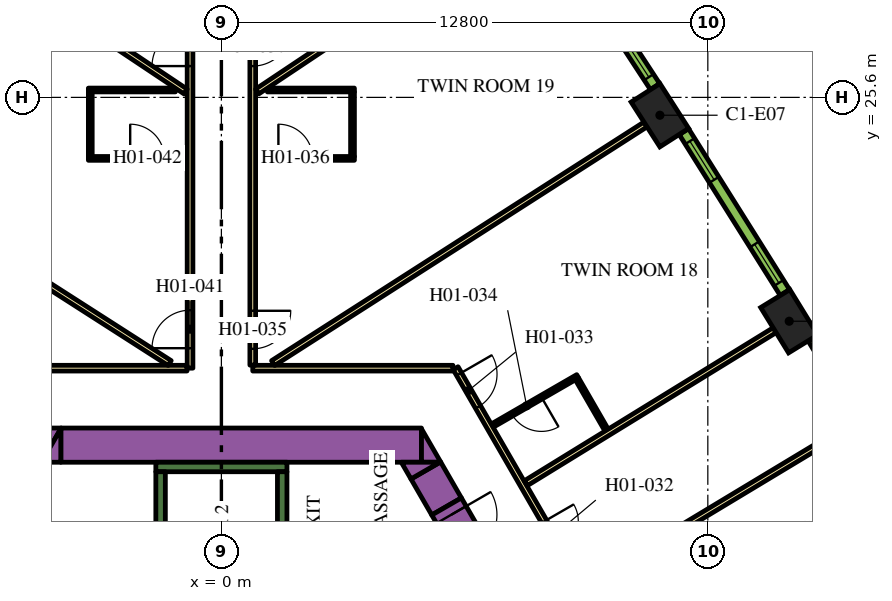
"""IFC4 building model, lengths in metres.
Left out: names, types, materials, properties, quantities, classifications, styles, units other than length and angle.
Written with IfcOpenShell. Run it as: python <this file> out.ifc"""

import sys

from ifc_helpers import new_model, si_unit, direction, frame, frame_2d, origin, origin_2d, place, context, subcontext, project, spatial, polyline, rectangle, outline, extrude, element, fill, save


model = new_model("IFC4")
c1 = context("Model", 3, precision=1e-05, world=origin(), true_north=direction((0.0, 1.0)))
c2 = subcontext(c1, "Body", "Model", "MODEL_VIEW")
j1 = project(units=[si_unit("LENGTHUNIT", "METRE"), si_unit("PLANEANGLEUNIT", "RADIAN")], contexts=[c1])
p1 = place(None, origin())
s1 = spatial("IfcSite", under=j1, at=p1, CompositionType="ELEMENT")
p2 = place(p1, origin())
s2 = spatial("IfcBuilding", under=s1, at=p2, CompositionType="ELEMENT")
p3 = place(p2, frame((0.0, 0.0, 27.6)))
s3 = spatial("IfcBuildingStorey", under=s2, at=p3, CompositionType="ELEMENT", Elevation=27.6)
for number, where, z_axis, x_axis in (
    (1, (14.942, 19.71, 0.0), (0.0, 0.0, 1.0), (-0.524, 0.852, 0.0)),
    (2, (11.539, 25.131, 0.0), (0.0, 0.0, 1.0), (-0.539, 0.842, 0.0)),
):
    element("IfcColumn", number, at=place(p3, frame(where, z_axis=z_axis, x_axis=x_axis)), inside=s3, PredefinedType="COLUMN", context=c2, shape_type="SweptSolid", body=[
        extrude(rectangle(XDim=1.4, YDim=0.9, at=origin_2d()), origin(), (0.0, 0.0, 1.0), 3.9),
    ])
p4 = place(p3, origin())
e3 = element("IfcWall", 3, at=p4, inside=s3, PredefinedType="SOLIDWALL", context=c2, shape_type="SweptSolid", body=[
    extrude(outline(polyline([(-4.215, 16.9), (-4.469, 16.46), (-5.231, 16.9), (-4.215, 16.9)])), origin(), (0.0, 0.0, 1.0), 3.9),
])
p5 = place(p3, frame((-4.224, 16.45, 0.0), z_axis=(0.0, 0.0, 1.0), x_axis=(1.0, 0.0, 0.0)))
e4 = element("IfcWall", 4, at=p5, inside=s3, PredefinedType="SOLIDWALL", context=c2, shape_type="SweptSolid", body=[
    extrude(rectangle(XDim=9.488, YDim=0.9, at=frame_2d((4.744, 0.0))), origin(), (0.0, 0.0, 1.0), 3.9),
])
e5 = element("IfcWall", 5, at=p4, inside=s3, PredefinedType="SOLIDWALL", context=c2, shape_type="SweptSolid", body=[
    extrude(outline(polyline([(5.265, 16.0), (5.265, 16.88), (5.773, 16.0), (5.265, 16.0)])), origin(), (0.0, 0.0, 1.0), 3.9),
])
e6 = element("IfcWall", 6, at=p4, inside=s3, PredefinedType="SOLIDWALL", context=c2, shape_type="SweptSolid", body=[
    extrude(outline(polyline([(-4.734, 16.0), (-4.226, 16.88), (-4.226, 16.0), (-4.734, 16.0)])), origin(), (0.0, 0.0, 1.0), 3.9),
])
p6 = place(p3, frame((5.926, 14.836, 0.0), z_axis=(0.0, 0.0, 1.0), x_axis=(-0.500076735116, 0.865981096212, 0.0)))
e7 = element("IfcWall", 7, at=p6, inside=s3, PredefinedType="SOLIDWALL", context=c2, shape_type="SweptSolid", body=[
    extrude(rectangle(XDim=1.094, YDim=0.9, at=frame_2d((0.547, 0.0))), origin(), (0.0, 0.0, 1.0), 3.9),
])
e8 = element("IfcWall", 8, at=p4, inside=s3, PredefinedType="SOLIDWALL", context=c2, shape_type="SweptSolid", body=[
    extrude(outline(polyline([(4.734, 16.0), (5.75, 16.0), (4.988, 15.56), (4.734, 16.0)])), origin(), (0.0, 0.0, 1.0), 3.9),
])
p7 = place(p3, frame((-1.725, 15.875, 0.0), z_axis=(0.0, 0.0, 1.0), x_axis=(1.0, 0.0, 0.0)))
e9 = element("IfcWall", 9, at=p7, inside=s3, PredefinedType="SOLIDWALL", context=c2, shape_type="SweptSolid", body=[
    extrude(rectangle(XDim=3.45, YDim=0.25, at=frame_2d((1.725, 0.0))), origin(), (0.0, 0.0, 1.0), 3.9),
])
p8 = place(p3, frame((1.6, 8.95, 0.0), z_axis=(0.0, 0.0, 1.0), x_axis=(0.0, 1.0, 0.0)))
e10 = element("IfcWall", 10, at=p8, inside=s3, PredefinedType="SOLIDWALL", context=c2, shape_type="SweptSolid", body=[
    extrude(rectangle(XDim=6.8, YDim=0.25, at=frame_2d((3.4, 0.0))), origin(), (0.0, 0.0, 1.0), 3.9),
])
p9 = place(p3, frame((-1.6, 8.7, 0.0), z_axis=(0.0, 0.0, 1.0), x_axis=(0.0, 1.0, 0.0)))
e11 = element("IfcWall", 11, at=p9, inside=s3, PredefinedType="SOLIDWALL", context=c2, shape_type="SweptSolid", body=[
    extrude(rectangle(XDim=7.05, YDim=0.25, at=frame_2d((3.525, 0.0))), origin(), (0.0, 0.0, 1.0), 3.9),
])
p10 = place(p3, frame((5.926, 14.836, 0.0), z_axis=(0.0, 0.0, 1.0), x_axis=(0.500062241894, -0.865989465428, 0.0)))
e12 = element("IfcWall", 12, at=p10, inside=s3, PredefinedType="SOLIDWALL", context=c2, shape_type="SweptSolid", body=[
    extrude(rectangle(XDim=1.7, YDim=0.9, at=frame_2d((0.85, 0.0))), origin(), (0.0, 0.0, 1.0), 3.9),
])
p11 = place(p10, frame((0.25, 0.0, 0.0)))
e13 = element("IfcOpeningElement", 13, at=p11, cuts=e12, PredefinedType="OPENING", context=c2, shape_type="SweptSolid", body=[
    extrude(rectangle(XDim=1.2, YDim=2.1, at=frame_2d((0.6, 1.05))), frame((0.0, 0.46, 0.0), z_axis=(0.0, -1.0, 0.0), x_axis=(1.0, 0.0, 0.0)), (0.0, 0.0, 1.0), 0.92),
])
p12 = place(p3, frame((6.163, 18.475, 0.0), z_axis=(0.0, 0.0, 1.0), x_axis=(0.500001317485, -0.866024643133, 0.0)))
e14 = element("IfcWall", 14, at=p12, inside=s3, PredefinedType="PARTITIONING", context=c2, shape_type="SweptSolid", body=[
    extrude(rectangle(XDim=25.767, YDim=0.15, at=frame_2d((12.883, 0.0))), origin(), (0.0, 0.0, 1.0), 2.75),
])
p13 = place(p12, frame((24.586, 0.0, 0.0)))
e15 = element("IfcOpeningElement", 15, at=p13, cuts=e14, PredefinedType="OPENING", context=c2, shape_type="SweptSolid", body=[
    extrude(rectangle(XDim=1.0, YDim=2.1, at=frame_2d((0.5, 1.05))), frame((0.0, 0.085, 0.0), z_axis=(0.0, -1.0, 0.0), x_axis=(1.0, 0.0, 0.0)), (0.0, 0.0, 1.0), 0.17),
])
p14 = place(p12, frame((19.319, 0.0, 0.0)))
e16 = element("IfcOpeningElement", 16, at=p14, cuts=e14, PredefinedType="OPENING", context=c2, shape_type="SweptSolid", body=[
    extrude(rectangle(XDim=1.0, YDim=2.1, at=frame_2d((0.5, 1.05))), frame((0.0, 0.085, 0.0), z_axis=(0.0, -1.0, 0.0), x_axis=(1.0, 0.0, 0.0)), (0.0, 0.0, 1.0), 0.17),
])
p15 = place(p12, frame((18.012, 0.0, 0.0)))
e17 = element("IfcOpeningElement", 17, at=p15, cuts=e14, PredefinedType="OPENING", context=c2, shape_type="SweptSolid", body=[
    extrude(rectangle(XDim=1.0, YDim=2.1, at=frame_2d((0.5, 1.05))), frame((0.0, 0.085, 0.0), z_axis=(0.0, -1.0, 0.0), x_axis=(1.0, 0.0, 0.0)), (0.0, 0.0, 1.0), 0.17),
])
p16 = place(p12, frame((6.824, 0.0, 0.0)))
e18 = element("IfcOpeningElement", 18, at=p16, cuts=e14, PredefinedType="OPENING", context=c2, shape_type="SweptSolid", body=[
    extrude(rectangle(XDim=1.1, YDim=2.1, at=frame_2d((0.55, 1.05))), frame((0.0, 0.085, 0.0), z_axis=(0.0, -1.0, 0.0), x_axis=(1.0, 0.0, 0.0)), (0.0, 0.0, 1.0), 0.17),
])
p17 = place(p12, frame((4.658, 0.0, 0.0)))
e19 = element("IfcOpeningElement", 19, at=p17, cuts=e14, PredefinedType="OPENING", context=c2, shape_type="SweptSolid", body=[
    extrude(rectangle(XDim=0.9, YDim=2.1, at=frame_2d((0.45, 1.05))), frame((0.0, 0.085, 0.0), z_axis=(0.0, -1.0, 0.0), x_axis=(1.0, 0.0, 0.0)), (0.0, 0.0, 1.0), 0.17),
])
p18 = place(p12, frame((0.18, 0.0, 0.0)))
e20 = element("IfcOpeningElement", 20, at=p18, cuts=e14, PredefinedType="OPENING", context=c2, shape_type="SweptSolid", body=[
    extrude(rectangle(XDim=1.0, YDim=2.1, at=frame_2d((0.5, 1.05))), frame((0.0, 0.085, 0.0), z_axis=(0.0, -1.0, 0.0), x_axis=(1.0, 0.0, 0.0)), (0.0, 0.0, 1.0), 0.17),
])
p19 = place(p3, frame((0.825, 18.475, 0.0), z_axis=(0.0, 0.0, 1.0), x_axis=(1.0, 0.0, 0.0)))
e21 = element("IfcWall", 21, at=p19, inside=s3, PredefinedType="PARTITIONING", context=c2, shape_type="SweptSolid", body=[
    extrude(rectangle(XDim=5.268, YDim=0.15, at=frame_2d((2.634, 0.0))), origin(), (0.0, 0.0, 1.0), 2.75),
])
p20 = place(p3, frame((0.825, 34.699, 0.0), z_axis=(0.0, 0.0, 1.0), x_axis=(0.0, -1.0, 0.0)))
e22 = element("IfcWall", 22, at=p20, inside=s3, PredefinedType="PARTITIONING", context=c2, shape_type="SweptSolid", body=[
    extrude(rectangle(XDim=16.144, YDim=0.15, at=frame_2d((8.072, 0.0))), origin(), (0.0, 0.0, 1.0), 2.75),
])
p21 = place(p20, frame((14.714, 0.0, 0.0)))
e23 = element("IfcOpeningElement", 23, at=p21, cuts=e22, PredefinedType="OPENING", context=c2, shape_type="SweptSolid", body=[
    extrude(rectangle(XDim=1.0, YDim=2.1, at=frame_2d((0.5, 1.05))), frame((0.0, 0.085, 0.0), z_axis=(0.0, -1.0, 0.0), x_axis=(1.0, 0.0, 0.0)), (0.0, 0.0, 1.0), 0.17),
])
p22 = place(p20, frame((7.275, 0.0, 0.0)))
e24 = element("IfcOpeningElement", 24, at=p22, cuts=e22, PredefinedType="OPENING", context=c2, shape_type="SweptSolid", body=[
    extrude(rectangle(XDim=1.0, YDim=2.1, at=frame_2d((0.5, 1.05))), frame((0.0, 0.085, 0.0), z_axis=(0.0, -1.0, 0.0), x_axis=(1.0, 0.0, 0.0)), (0.0, 0.0, 1.0), 0.17),
])
p23 = place(p3, frame((-0.825, 18.475, 0.0), z_axis=(0.0, 0.0, 1.0), x_axis=(0.0, 1.0, 0.0)))
e25 = element("IfcWall", 25, at=p23, inside=s3, PredefinedType="PARTITIONING", context=c2, shape_type="SweptSolid", body=[
    extrude(rectangle(XDim=16.224, YDim=0.15, at=frame_2d((8.112, 0.0))), origin(), (0.0, 0.0, 1.0), 2.75),
])
p24 = place(p23, frame((7.949, 0.0, 0.0)))
e26 = element("IfcOpeningElement", 26, at=p24, cuts=e25, PredefinedType="OPENING", context=c2, shape_type="SweptSolid", body=[
    extrude(rectangle(XDim=1.0, YDim=2.1, at=frame_2d((0.5, 1.05))), frame((0.0, 0.085, 0.0), z_axis=(0.0, -1.0, 0.0), x_axis=(1.0, 0.0, 0.0)), (0.0, 0.0, 1.0), 0.17),
])
p25 = place(p23, frame((0.526, 0.0, 0.0)))
e27 = element("IfcOpeningElement", 27, at=p25, cuts=e25, PredefinedType="OPENING", context=c2, shape_type="SweptSolid", body=[
    extrude(rectangle(XDim=1.0, YDim=2.1, at=frame_2d((0.5, 1.05))), frame((0.0, 0.085, 0.0), z_axis=(0.0, -1.0, 0.0), x_axis=(1.0, 0.0, 0.0)), (0.0, 0.0, 1.0), 0.17),
])
p26 = place(p3, frame((-6.163, 18.475, 0.0), z_axis=(0.0, 0.0, 1.0), x_axis=(1.0, 0.0, 0.0)))
e28 = element("IfcWall", 28, at=p26, inside=s3, PredefinedType="PARTITIONING", context=c2, shape_type="SweptSolid", body=[
    extrude(rectangle(XDim=5.258, YDim=0.15, at=frame_2d((2.629, 0.0))), origin(), (0.0, 0.0, 1.0), 2.75),
])
p27 = place(p3, frame((-11.16, 24.888, 0.0), z_axis=(0.0, 0.0, 1.0), x_axis=(0.84199813156, -0.539480441211, 0.0)))
e29 = element("IfcWall", 29, at=p27, inside=s3, PredefinedType="PARTITIONING", context=c2, shape_type="SweptSolid", body=[
    extrude(rectangle(XDim=11.638, YDim=0.15, at=frame_2d((5.819, 0.0))), origin(), (0.0, 0.0, 1.0), 2.75),
])
for number, where, z_axis, x_axis in (
    (30, (-7.662, 30.238, 0.0), (0.0, 0.0, 1.0), (0.832, -0.555, 0.0)),
    (31, (7.662, 30.238, 0.0), (0.0, 0.0, 1.0), (-0.832, -0.555, 0.0)),
):
    element("IfcWall", number, at=place(p3, frame(where, z_axis=z_axis, x_axis=x_axis)), inside=s3, PredefinedType="PARTITIONING", context=c2, shape_type="SweptSolid", body=[
        extrude(rectangle(XDim=8.079, YDim=0.15, at=frame_2d((4.04, 0.0))), origin(), (0.0, 0.0, 1.0), 2.75),
    ])
p28 = place(p3, frame((11.16, 24.888, 0.0), z_axis=(0.0, 0.0, 1.0), x_axis=(-0.84199813156, -0.539480441211, 0.0)))
e32 = element("IfcWall", 32, at=p28, inside=s3, PredefinedType="PARTITIONING", context=c2, shape_type="SweptSolid", body=[
    extrude(rectangle(XDim=11.638, YDim=0.15, at=frame_2d((5.819, 0.0))), origin(), (0.0, 0.0, 1.0), 2.75),
])
p29 = place(p3, frame((14.558, 19.475, 0.0), z_axis=(0.0, 0.0, 1.0), x_axis=(-0.851829455142, -0.523819223925, 0.0)))
e33 = element("IfcWall", 33, at=p29, inside=s3, PredefinedType="PARTITIONING", context=c2, shape_type="SweptSolid", body=[
    extrude(rectangle(XDim=7.688, YDim=0.15, at=frame_2d((3.844, 0.0))), origin(), (0.0, 0.0, 1.0), 2.75),
])
p30 = place(p3, frame((16.729, 17.052, 0.0), z_axis=(0.0, 0.0, 1.0), x_axis=(-0.856630606266, -0.515930232113, 0.0)))
e34 = element("IfcWall", 34, at=p30, inside=s3, PredefinedType="PARTITIONING", context=c2, shape_type="SweptSolid", body=[
    extrude(rectangle(XDim=8.355, YDim=0.15, at=frame_2d((4.178, 0.0))), origin(), (0.0, 0.0, 1.0), 2.75),
])
p31 = place(p3, frame((9.375, 18.261, 0.0), z_axis=(0.0, 0.0, 1.0), x_axis=(-0.866021400173, -0.500006934395, 0.0)))
e35 = element("IfcWall", 35, at=p31, inside=s3, PredefinedType="PARTITIONING", context=c2, shape_type="SweptSolid", body=[
    extrude(rectangle(XDim=2.6, YDim=0.1, at=frame_2d((1.3, 0.0))), origin(), (0.0, 0.0, 1.0), 2.75),
])
p32 = place(p31, frame((1.1, 0.0, 0.0)))
e36 = element("IfcOpeningElement", 36, at=p32, cuts=e35, PredefinedType="OPENING", context=c2, shape_type="SweptSolid", body=[
    extrude(rectangle(XDim=0.9, YDim=2.1, at=frame_2d((0.45, 1.05))), frame((0.0, 0.06, 0.0), z_axis=(0.0, -1.0, 0.0), x_axis=(1.0, 0.0, 0.0)), (0.0, 0.0, 1.0), 0.12),
])
p33 = place(p3, frame((9.357, 18.193, 0.0), z_axis=(0.0, 0.0, 1.0), x_axis=(0.499899694197, -0.866083307622, 0.0)))
e37 = element("IfcWall", 37, at=p33, inside=s3, PredefinedType="PARTITIONING", context=c2, shape_type="SweptSolid", body=[
    extrude(rectangle(XDim=1.55, YDim=0.1, at=frame_2d((0.775, 0.0))), origin(), (0.0, 0.0, 1.0), 2.75),
])
p34 = place(p3, frame((0.9, 23.994, 0.0), z_axis=(0.0, 0.0, 1.0), x_axis=(1.0, 0.0, 0.0)))
e38 = element("IfcWall", 38, at=p34, inside=s3, PredefinedType="PARTITIONING", context=c2, shape_type="SweptSolid", body=[
    extrude(rectangle(XDim=2.6, YDim=0.1, at=frame_2d((1.3, 0.0))), origin(), (0.0, 0.0, 1.0), 2.75),
])
p35 = place(p34, frame((0.6, 0.0, 0.0)))
e39 = element("IfcOpeningElement", 39, at=p35, cuts=e38, PredefinedType="OPENING", context=c2, shape_type="SweptSolid", body=[
    extrude(rectangle(XDim=0.9, YDim=2.1, at=frame_2d((0.45, 1.05))), frame((0.0, 0.06, 0.0), z_axis=(0.0, -1.0, 0.0), x_axis=(1.0, 0.0, 0.0)), (0.0, 0.0, 1.0), 0.12),
])
p36 = place(p3, frame((3.45, 24.044, 0.0), z_axis=(0.0, 0.0, 1.0), x_axis=(0.0, 1.0, 0.0)))
e40 = element("IfcWall", 40, at=p36, inside=s3, PredefinedType="PARTITIONING", context=c2, shape_type="SweptSolid", body=[
    extrude(rectangle(XDim=1.7, YDim=0.1, at=frame_2d((0.85, 0.0))), origin(), (0.0, 0.0, 1.0), 2.75),
])
p37 = place(p3, frame((1.21, 25.794, 0.0), z_axis=(0.0, 0.0, 1.0), x_axis=(1.0, 0.0, 0.0)))
e41 = element("IfcWall", 41, at=p37, inside=s3, PredefinedType="PARTITIONING", context=c2, shape_type="SweptSolid", body=[
    extrude(rectangle(XDim=2.29, YDim=0.1, at=frame_2d((1.145, 0.0))), origin(), (0.0, 0.0, 1.0), 2.75),
])
p38 = place(p3, frame((-3.5, 23.995, 0.0), z_axis=(0.0, 0.0, 1.0), x_axis=(1.0, 0.0, 0.0)))
e42 = element("IfcWall", 42, at=p38, inside=s3, PredefinedType="PARTITIONING", context=c2, shape_type="SweptSolid", body=[
    extrude(rectangle(XDim=2.6, YDim=0.1, at=frame_2d((1.3, 0.0))), origin(), (0.0, 0.0, 1.0), 2.75),
])
p39 = place(p38, frame((1.1, 0.0, 0.0)))
e43 = element("IfcOpeningElement", 43, at=p39, cuts=e42, PredefinedType="OPENING", context=c2, shape_type="SweptSolid", body=[
    extrude(rectangle(XDim=0.9, YDim=2.1, at=frame_2d((0.45, 1.05))), frame((0.0, 0.06, 0.0), z_axis=(0.0, -1.0, 0.0), x_axis=(1.0, 0.0, 0.0)), (0.0, 0.0, 1.0), 0.12),
])
p40 = place(p3, frame((-3.45, 24.045, 0.0), z_axis=(0.0, 0.0, 1.0), x_axis=(0.0, 1.0, 0.0)))
e44 = element("IfcWall", 44, at=p40, inside=s3, PredefinedType="PARTITIONING", context=c2, shape_type="SweptSolid", body=[
    extrude(rectangle(XDim=1.7, YDim=0.1, at=frame_2d((0.85, 0.0))), origin(), (0.0, 0.0, 1.0), 2.75),
])
p41 = place(p3, frame((-1.21, 25.795, 0.0), z_axis=(0.0, 0.0, 1.0), x_axis=(-1.0, 0.0, 0.0)))
e45 = element("IfcWall", 45, at=p41, inside=s3, PredefinedType="PARTITIONING", context=c2, shape_type="SweptSolid", body=[
    extrude(rectangle(XDim=2.29, YDim=0.1, at=frame_2d((1.145, 0.0))), origin(), (0.0, 0.0, 1.0), 2.75),
])
p42 = place(p3, frame((18.143, 14.986, 0.0), z_axis=(0.0, 0.0, 1.0), x_axis=(-0.515938796285, 0.856625448191, 0.0)))
e46 = element("IfcWall", 46, at=p42, inside=s3, PredefinedType="SOLIDWALL", context=c2, shape_type="SweptSolid", body=[
    extrude(rectangle(XDim=4.998, YDim=0.29, at=frame_2d((2.499, 0.0))), origin(), (0.0, 0.0, 1.0), 3.65),
])
p43 = place(p42, frame((0.297, 0.0, 0.9)))
e47 = element("IfcOpeningElement", 47, at=p43, cuts=e46, PredefinedType="OPENING", context=c2, shape_type="SweptSolid", body=[
    extrude(rectangle(XDim=1.2, YDim=2.15, at=frame_2d((0.6, 1.075))), frame((0.0, 0.155, 0.0), z_axis=(0.0, -1.0, 0.0), x_axis=(1.0, 0.0, 0.0)), (0.0, 0.0, 1.0), 0.31),
])
p44 = place(p42, frame((3.501, 0.0, 0.9)))
e48 = element("IfcOpeningElement", 48, at=p44, cuts=e46, PredefinedType="OPENING", context=c2, shape_type="SweptSolid", body=[
    extrude(rectangle(XDim=1.2, YDim=2.15, at=frame_2d((0.6, 1.075))), frame((0.0, 0.155, 0.0), z_axis=(0.0, -1.0, 0.0), x_axis=(1.0, 0.0, 0.0)), (0.0, 0.0, 1.0), 0.31),
])
p45 = place(p3, frame((14.827, 20.466, 0.0), z_axis=(0.0, 0.0, 1.0), x_axis=(-0.531688286542, 0.846940119462, 0.0)))
e49 = element("IfcWall", 49, at=p45, inside=s3, PredefinedType="SOLIDWALL", context=c2, shape_type="SweptSolid", body=[
    extrude(rectangle(XDim=4.998, YDim=0.29, at=frame_2d((2.499, 0.0))), origin(), (0.0, 0.0, 1.0), 3.65),
])
p46 = place(p45, frame((0.297, 0.0, 0.9)))
e50 = element("IfcOpeningElement", 50, at=p46, cuts=e49, PredefinedType="OPENING", context=c2, shape_type="SweptSolid", body=[
    extrude(rectangle(XDim=1.2, YDim=2.15, at=frame_2d((0.6, 1.075))), frame((0.0, 0.155, 0.0), z_axis=(0.0, -1.0, 0.0), x_axis=(1.0, 0.0, 0.0)), (0.0, 0.0, 1.0), 0.31),
])
p47 = place(p45, frame((3.501, 0.0, 0.9)))
e51 = element("IfcOpeningElement", 51, at=p47, cuts=e49, PredefinedType="OPENING", context=c2, shape_type="SweptSolid", body=[
    extrude(rectangle(XDim=1.2, YDim=2.15, at=frame_2d((0.6, 1.075))), frame((0.0, 0.155, 0.0), z_axis=(0.0, -1.0, 0.0), x_axis=(1.0, 0.0, 0.0)), (0.0, 0.0, 1.0), 0.31),
])
p48 = place(p3, frame((11.411, 25.884, 0.0), z_axis=(0.0, 0.0, 1.0), x_axis=(-0.547204617628, 0.836998868845, 0.0)))
e52 = element("IfcWall", 52, at=p48, inside=s3, PredefinedType="SOLIDWALL", context=c2, shape_type="SweptSolid", body=[
    extrude(rectangle(XDim=4.998, YDim=0.29, at=frame_2d((2.499, 0.0))), origin(), (0.0, 0.0, 1.0), 3.65),
])
p49 = place(p48, frame((0.297, 0.0, 0.9)))
e53 = element("IfcOpeningElement", 53, at=p49, cuts=e52, PredefinedType="OPENING", context=c2, shape_type="SweptSolid", body=[
    extrude(rectangle(XDim=1.2, YDim=2.15, at=frame_2d((0.6, 1.075))), frame((0.0, 0.155, 0.0), z_axis=(0.0, -1.0, 0.0), x_axis=(1.0, 0.0, 0.0)), (0.0, 0.0, 1.0), 0.31),
])
p50 = place(p48, frame((3.501, 0.0, 0.9)))
e54 = element("IfcOpeningElement", 54, at=p50, cuts=e52, PredefinedType="OPENING", context=c2, shape_type="SweptSolid", body=[
    extrude(rectangle(XDim=1.2, YDim=2.15, at=frame_2d((0.6, 1.075))), frame((0.0, 0.155, 0.0), z_axis=(0.0, -1.0, 0.0), x_axis=(1.0, 0.0, 0.0)), (0.0, 0.0, 1.0), 0.31),
])
p51 = place(p11, origin())
e55 = element("IfcDoor", 55, at=p51, inside=s3, OperationType="SINGLE_SWING_LEFT", PredefinedType="DOOR", context=c2, shape_type="SweptSolid", body=[
    extrude(rectangle(XDim=1.2, YDim=2.1, at=frame_2d((0.6, 1.05))), frame((0.0, 0.025, 0.0), z_axis=(0.0, -1.0, 0.0), x_axis=(1.0, 0.0, 0.0)), (0.0, 0.0, 1.0), 0.05),
])
fill(e13, e55)
p52 = place(p17, origin())
e56 = element("IfcDoor", 56, at=p52, inside=s3, OperationType="SINGLE_SWING_LEFT", PredefinedType="DOOR", context=c2, shape_type="SweptSolid", body=[
    extrude(rectangle(XDim=0.9, YDim=2.1, at=frame_2d((0.45, 1.05))), frame((0.0, 0.025, 0.0), z_axis=(0.0, -1.0, 0.0), x_axis=(1.0, 0.0, 0.0)), (0.0, 0.0, 1.0), 0.05),
])
fill(e19, e56)
p53 = place(p18, origin())
e57 = element("IfcDoor", 57, at=p53, inside=s3, OperationType="SINGLE_SWING_LEFT", PredefinedType="DOOR", context=c2, shape_type="SweptSolid", body=[
    extrude(rectangle(XDim=1.0, YDim=2.1, at=frame_2d((0.5, 1.05))), frame((0.0, 0.025, 0.0), z_axis=(0.0, -1.0, 0.0), x_axis=(1.0, 0.0, 0.0)), (0.0, 0.0, 1.0), 0.05),
])
fill(e20, e57)
p54 = place(p32, origin())
e58 = element("IfcDoor", 58, at=p54, inside=s3, OperationType="SINGLE_SWING_RIGHT", PredefinedType="DOOR", context=c2, shape_type="SweptSolid", body=[
    extrude(rectangle(XDim=0.9, YDim=2.1, at=frame_2d((0.45, 1.05))), frame((0.0, 0.025, 0.0), z_axis=(0.0, -1.0, 0.0), x_axis=(1.0, 0.0, 0.0)), (0.0, 0.0, 1.0), 0.05),
])
fill(e36, e58)
p55 = place(p21, origin())
e59 = element("IfcDoor", 59, at=p55, inside=s3, OperationType="SINGLE_SWING_RIGHT", PredefinedType="DOOR", context=c2, shape_type="SweptSolid", body=[
    extrude(rectangle(XDim=1.0, YDim=2.1, at=frame_2d((0.5, 1.05))), frame((0.0, 0.025, 0.0), z_axis=(0.0, -1.0, 0.0), x_axis=(1.0, 0.0, 0.0)), (0.0, 0.0, 1.0), 0.05),
])
fill(e23, e59)
p56 = place(p35, origin())
e60 = element("IfcDoor", 60, at=p56, inside=s3, OperationType="SINGLE_SWING_LEFT", PredefinedType="DOOR", context=c2, shape_type="SweptSolid", body=[
    extrude(rectangle(XDim=0.9, YDim=2.1, at=frame_2d((0.45, 1.05))), frame((0.0, 0.025, 0.0), z_axis=(0.0, -1.0, 0.0), x_axis=(1.0, 0.0, 0.0)), (0.0, 0.0, 1.0), 0.05),
])
fill(e39, e60)
p57 = place(p22, origin())
e61 = element("IfcDoor", 61, at=p57, inside=s3, OperationType="SINGLE_SWING_RIGHT", PredefinedType="DOOR", context=c2, shape_type="SweptSolid", body=[
    extrude(rectangle(XDim=1.0, YDim=2.1, at=frame_2d((0.5, 1.05))), frame((0.0, 0.025, 0.0), z_axis=(0.0, -1.0, 0.0), x_axis=(1.0, 0.0, 0.0)), (0.0, 0.0, 1.0), 0.05),
])
fill(e24, e61)
p58 = place(p24, origin())
e62 = element("IfcDoor", 62, at=p58, inside=s3, OperationType="SINGLE_SWING_LEFT", PredefinedType="DOOR", context=c2, shape_type="SweptSolid", body=[
    extrude(rectangle(XDim=1.0, YDim=2.1, at=frame_2d((0.5, 1.05))), frame((0.0, 0.025, 0.0), z_axis=(0.0, -1.0, 0.0), x_axis=(1.0, 0.0, 0.0)), (0.0, 0.0, 1.0), 0.05),
])
fill(e26, e62)
p59 = place(p25, origin())
e63 = element("IfcDoor", 63, at=p59, inside=s3, OperationType="SINGLE_SWING_LEFT", PredefinedType="DOOR", context=c2, shape_type="SweptSolid", body=[
    extrude(rectangle(XDim=1.0, YDim=2.1, at=frame_2d((0.5, 1.05))), frame((0.0, 0.025, 0.0), z_axis=(0.0, -1.0, 0.0), x_axis=(1.0, 0.0, 0.0)), (0.0, 0.0, 1.0), 0.05),
])
fill(e27, e63)
p60 = place(p39, origin())
e64 = element("IfcDoor", 64, at=p60, inside=s3, OperationType="SINGLE_SWING_LEFT", PredefinedType="DOOR", context=c2, shape_type="SweptSolid", body=[
    extrude(rectangle(XDim=0.9, YDim=2.1, at=frame_2d((0.45, 1.05))), frame((0.0, 0.025, 0.0), z_axis=(0.0, -1.0, 0.0), x_axis=(1.0, 0.0, 0.0)), (0.0, 0.0, 1.0), 0.05),
])
fill(e43, e64)
p61 = place(p46, origin())
e65 = element("IfcWindow", 65, at=p61, inside=s3, PartitioningType="DOUBLE_PANEL_VERTICAL", PredefinedType="WINDOW", context=c2, shape_type="SweptSolid", body=[
    extrude(rectangle(XDim=1.2, YDim=2.15, at=frame_2d((0.6, 1.075))), frame((0.0, 0.015, 0.0), z_axis=(0.0, -1.0, 0.0), x_axis=(1.0, 0.0, 0.0)), (0.0, 0.0, 1.0), 0.06),
])
fill(e50, e65)
p62 = place(p47, origin())
e66 = element("IfcWindow", 66, at=p62, inside=s3, PartitioningType="DOUBLE_PANEL_VERTICAL", PredefinedType="WINDOW", context=c2, shape_type="SweptSolid", body=[
    extrude(rectangle(XDim=1.2, YDim=2.15, at=frame_2d((0.6, 1.075))), frame((0.0, 0.015, 0.0), z_axis=(0.0, -1.0, 0.0), x_axis=(1.0, 0.0, 0.0)), (0.0, 0.0, 1.0), 0.06),
])
fill(e51, e66)
p63 = place(p49, origin())
e67 = element("IfcWindow", 67, at=p63, inside=s3, PartitioningType="DOUBLE_PANEL_VERTICAL", PredefinedType="WINDOW", context=c2, shape_type="SweptSolid", body=[
    extrude(rectangle(XDim=1.2, YDim=2.15, at=frame_2d((0.6, 1.075))), frame((0.0, 0.015, 0.0), z_axis=(0.0, -1.0, 0.0), x_axis=(1.0, 0.0, 0.0)), (0.0, 0.0, 1.0), 0.06),
])
fill(e53, e67)
save(model, sys.argv[1])
